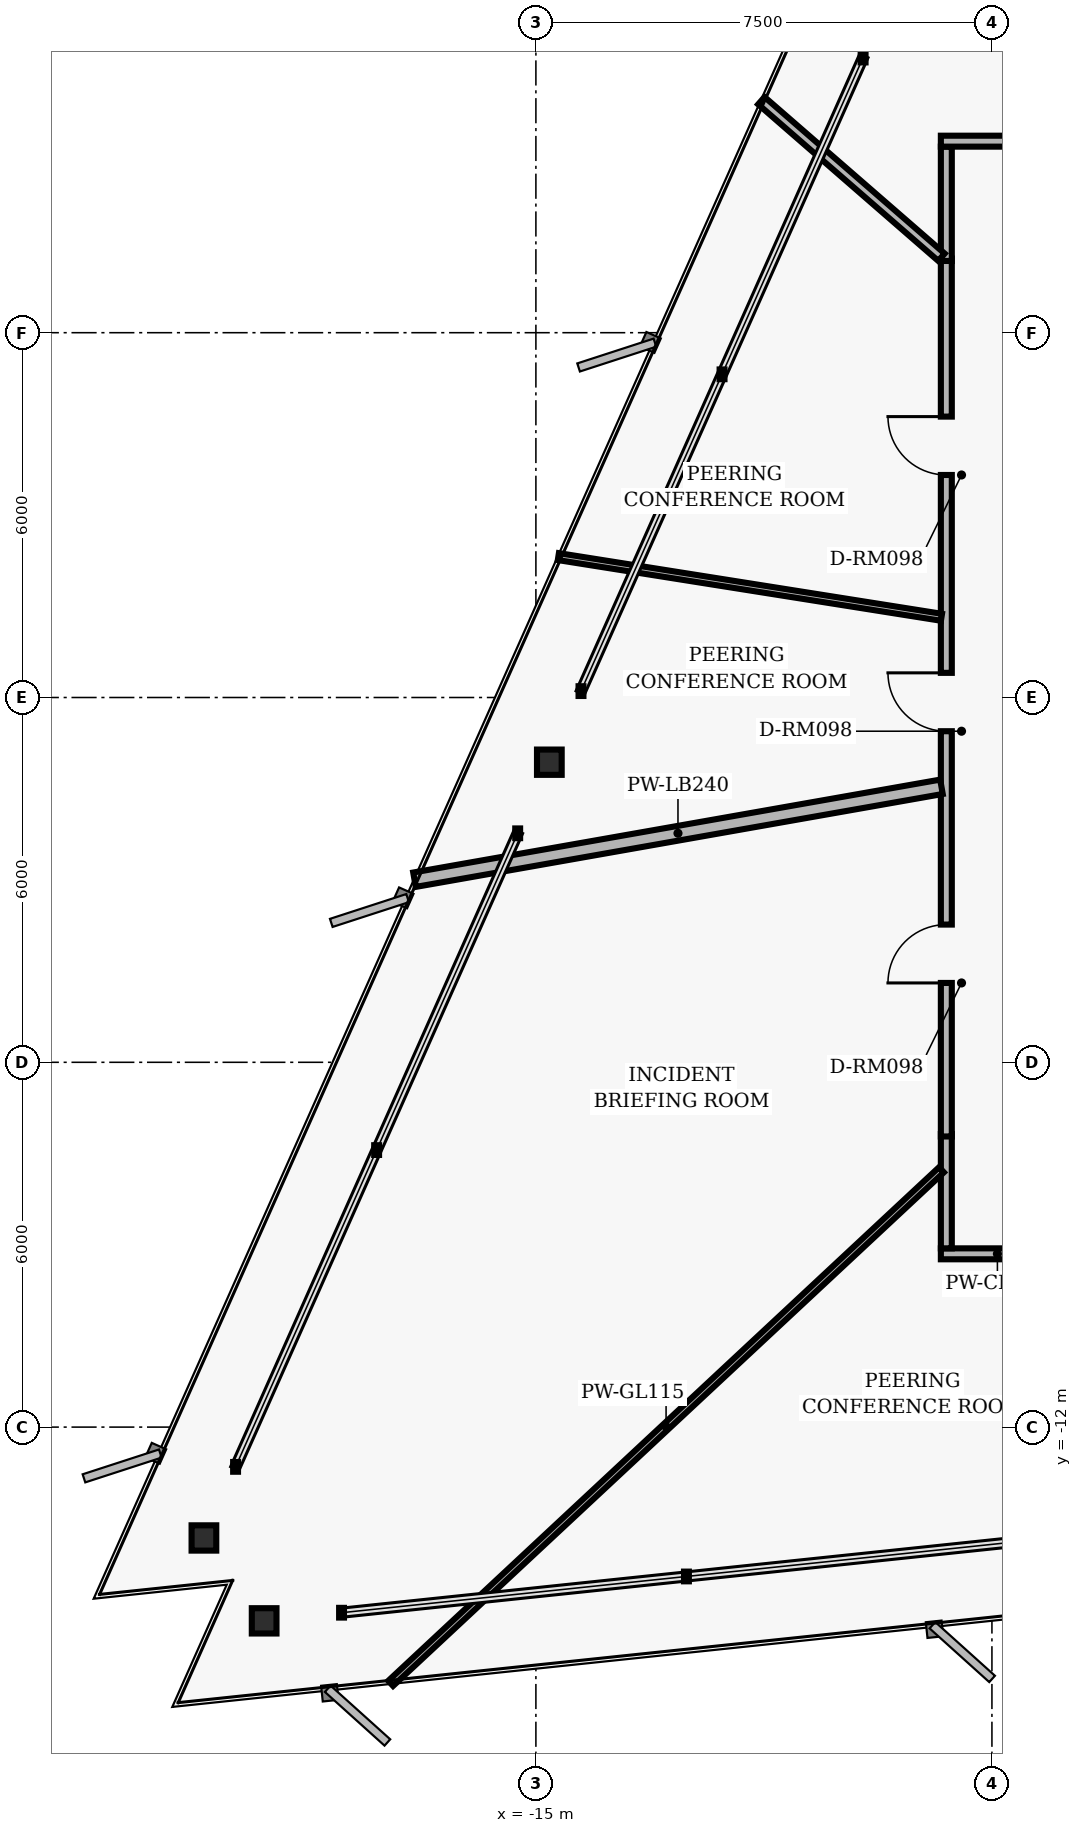
"""IFC4 building model, lengths in metres.
Left out: names, types, materials, properties, quantities, classifications, styles, units other than length and angle.
Written with IfcOpenShell. Run it as: python <this file> out.ifc"""

import sys

from ifc_helpers import new_model, si_unit, direction, frame, frame_2d, origin, origin_2d, place, context, subcontext, project, spatial, rectangle, i_section, extrude, element, fill, save


model = new_model("IFC4")
c1 = context("Model", 3, precision=1e-05, world=origin(), true_north=direction((0.0, 1.0)))
c2 = subcontext(c1, "Body", "Model", "MODEL_VIEW")
j1 = project(units=[si_unit("LENGTHUNIT", "METRE"), si_unit("PLANEANGLEUNIT", "RADIAN")], contexts=[c1])
p1 = place(None, origin())
s1 = spatial("IfcSite", under=j1, at=p1, CompositionType="ELEMENT")
p2 = place(p1, origin())
s2 = spatial("IfcBuilding", under=s1, at=p2, CompositionType="ELEMENT")
p3 = place(p2, frame((0.0, 0.0, 116.8)))
s3 = spatial("IfcBuildingStorey", under=s2, at=p3, CompositionType="ELEMENT", Elevation=116.8)
for number, where, z_axis, x_axis in (
    (1, (-14.779, -1.064, 0.0), (0.0, 0.0, 1.0), (1.0, 0.0, 0.0)),
    (2, (-20.46, -13.823, 0.0), (0.0, 0.0, 1.0), (1.0, 0.0, 0.0)),
    (3, (-19.469, -15.187, 0.0), (0.0, 0.0, 1.0), (1.0, 0.0, 0.0)),
):
    element("IfcColumn", number, at=place(p3, frame(where, z_axis=z_axis, x_axis=x_axis)), inside=s3, PredefinedType="COLUMN", context=c2, shape_type="SweptSolid", body=[
        extrude(i_section(OverallWidth=0.406, OverallDepth=0.416, WebThickness=0.03, FlangeThickness=0.048, FilletRadius=0.02, at=origin_2d()), origin(), (0.0, 0.0, 1.0), 3.04),
    ])
p4 = place(p3, frame((-6.48, -9.15, 0.0), z_axis=(0.0, 0.0, 1.0), x_axis=(-1.0, 0.0, 0.0)))
e4 = element("IfcWall", 4, at=p4, inside=s3, PredefinedType="PARTITIONING", context=c2, shape_type="SweptSolid", body=[
    extrude(rectangle(XDim=1.86, YDim=0.18, at=frame_2d((0.93, 0.0))), origin(), (0.0, 0.0, 1.0), 2.33),
])
p5 = place(p3, frame((-8.25, -9.06, 0.0), z_axis=(0.0, 0.0, 1.0), x_axis=(0.0, 1.0, 0.0)))
e5 = element("IfcWall", 5, at=p5, inside=s3, PredefinedType="PARTITIONING", context=c2, shape_type="SweptSolid", body=[
    extrude(rectangle(XDim=1.88, YDim=0.18, at=frame_2d((0.94, 0.0))), origin(), (0.0, 0.0, 1.0), 2.763),
])
p6 = place(p3, frame((-8.25, -7.22, 0.0), z_axis=(0.0, 0.0, 1.0), x_axis=(0.0, 1.0, 0.0)))
e6 = element("IfcWall", 6, at=p6, inside=s3, PredefinedType="PARTITIONING", context=c2, shape_type="SweptSolid", body=[
    extrude(rectangle(XDim=14.44, YDim=0.18, at=frame_2d((7.22, 0.0))), origin(), (0.0, 0.0, 1.0), 2.33),
])
p7 = place(p6, frame((6.665, 0.0, 0.0)))
e7 = element("IfcOpeningElement", 7, at=p7, cuts=e6, PredefinedType="OPENING", context=c2, shape_type="SweptSolid", body=[
    extrude(rectangle(XDim=0.96, YDim=2.02, at=frame_2d((0.48, 1.01))), frame((0.0, 0.1, 0.0), z_axis=(0.0, -1.0, 0.0), x_axis=(1.0, 0.0, 0.0)), (0.0, 0.0, 1.0), 0.2),
])
p8 = place(p6, frame((2.525, 0.0, 0.0)))
e8 = element("IfcOpeningElement", 8, at=p8, cuts=e6, PredefinedType="OPENING", context=c2, shape_type="SweptSolid", body=[
    extrude(rectangle(XDim=0.96, YDim=2.02, at=frame_2d((0.48, 1.01))), frame((0.0, 0.1, 0.0), z_axis=(0.0, -1.0, 0.0), x_axis=(1.0, 0.0, 0.0)), (0.0, 0.0, 1.0), 0.2),
])
p9 = place(p6, frame((10.88, 0.0, 0.0)))
e9 = element("IfcOpeningElement", 9, at=p9, cuts=e6, PredefinedType="OPENING", context=c2, shape_type="SweptSolid", body=[
    extrude(rectangle(XDim=0.96, YDim=2.02, at=frame_2d((0.48, 1.01))), frame((0.0, 0.1, 0.0), z_axis=(0.0, -1.0, 0.0), x_axis=(1.0, 0.0, 0.0)), (0.0, 0.0, 1.0), 0.2),
])
p10 = place(p3, frame((-8.25, 7.18, 0.0), z_axis=(0.0, 0.0, 1.0), x_axis=(0.0, 1.0, 0.0)))
e10 = element("IfcWall", 10, at=p10, inside=s3, PredefinedType="PARTITIONING", context=c2, shape_type="SweptSolid", body=[
    extrude(rectangle(XDim=1.88, YDim=0.18, at=frame_2d((0.94, 0.0))), origin(), (0.0, 0.0, 1.0), 2.763),
])
p11 = place(p3, frame((-8.34, 9.15, 0.0), z_axis=(0.0, 0.0, 1.0), x_axis=(1.0, 0.0, 0.0)))
e11 = element("IfcWall", 11, at=p11, inside=s3, PredefinedType="PARTITIONING", context=c2, shape_type="SweptSolid", body=[
    extrude(rectangle(XDim=1.86, YDim=0.18, at=frame_2d((0.93, 0.0))), origin(), (0.0, 0.0, 1.0), 2.763),
])
p12 = place(p3, frame((-8.33, -1.469, 0.0), z_axis=(0.0, 0.0, 1.0), x_axis=(-0.984804219106, -0.173668218255, 0.0)))
e12 = element("IfcWall", 12, at=p12, inside=s3, PredefinedType="PARTITIONING", context=c2, shape_type="SweptSolid", body=[
    extrude(rectangle(XDim=8.8, YDim=0.24, at=frame_2d((4.4, 0.0))), origin(), (0.0, 0.0, 1.0), 2.763),
])
p13 = place(p3, frame((-8.33, -7.768, 0.0), z_axis=(0.0, 0.0, 1.0), x_axis=(-0.731355419522, -0.681996517833, 0.0)))
e13 = element("IfcWall", 13, at=p13, inside=s3, PredefinedType="MOVABLE", context=c2, shape_type="SweptSolid", body=[
    extrude(rectangle(XDim=12.385, YDim=0.115, at=frame_2d((6.193, 0.0))), origin(), (0.0, 0.0, 1.0), 2.763),
])
p14 = place(p3, frame((-8.33, 7.241, 0.0), z_axis=(0.0, 0.0, 1.0), x_axis=(-0.754715330954, 0.656052413472, 0.0)))
e14 = element("IfcWall", 14, at=p14, inside=s3, PredefinedType="PARTITIONING", context=c2, shape_type="SweptSolid", body=[
    extrude(rectangle(XDim=3.925, YDim=0.16, at=frame_2d((1.962, 0.0))), origin(), (0.0, 0.0, 1.0), 2.763),
])
p15 = place(p3, frame((-8.33, 1.319, 0.0), z_axis=(0.0, 0.0, 1.0), x_axis=(-0.987684953503, 0.156455848798, 0.0)))
e15 = element("IfcWall", 15, at=p15, inside=s3, PredefinedType="MOVABLE", context=c2, shape_type="SweptSolid", body=[
    extrude(rectangle(XDim=6.379, YDim=0.115, at=frame_2d((3.189, 0.0))), origin(), (0.0, 0.0, 1.0), 2.763),
])
p16 = place(p7, origin())
e16 = element("IfcDoor", 16, at=p16, inside=s3, OperationType="SINGLE_SWING_RIGHT", PredefinedType="DOOR", context=c2, shape_type="SweptSolid", body=[
    extrude(rectangle(XDim=0.96, YDim=2.02, at=frame_2d((0.48, 1.01))), frame((0.0, 0.025, 0.0), z_axis=(0.0, -1.0, 0.0), x_axis=(1.0, 0.0, 0.0)), (0.0, 0.0, 1.0), 0.05),
])
fill(e7, e16)
p17 = place(p8, origin())
e17 = element("IfcDoor", 17, at=p17, inside=s3, OperationType="SINGLE_SWING_LEFT", PredefinedType="DOOR", context=c2, shape_type="SweptSolid", body=[
    extrude(rectangle(XDim=0.96, YDim=2.02, at=frame_2d((0.48, 1.01))), frame((0.0, 0.025, 0.0), z_axis=(0.0, -1.0, 0.0), x_axis=(1.0, 0.0, 0.0)), (0.0, 0.0, 1.0), 0.05),
])
fill(e8, e17)
p18 = place(p9, origin())
e18 = element("IfcDoor", 18, at=p18, inside=s3, OperationType="SINGLE_SWING_RIGHT", PredefinedType="DOOR", context=c2, shape_type="SweptSolid", body=[
    extrude(rectangle(XDim=0.96, YDim=2.02, at=frame_2d((0.48, 1.01))), frame((0.0, 0.025, 0.0), z_axis=(0.0, -1.0, 0.0), x_axis=(1.0, 0.0, 0.0)), (0.0, 0.0, 1.0), 0.05),
])
fill(e9, e18)
save(model, sys.argv[1])
